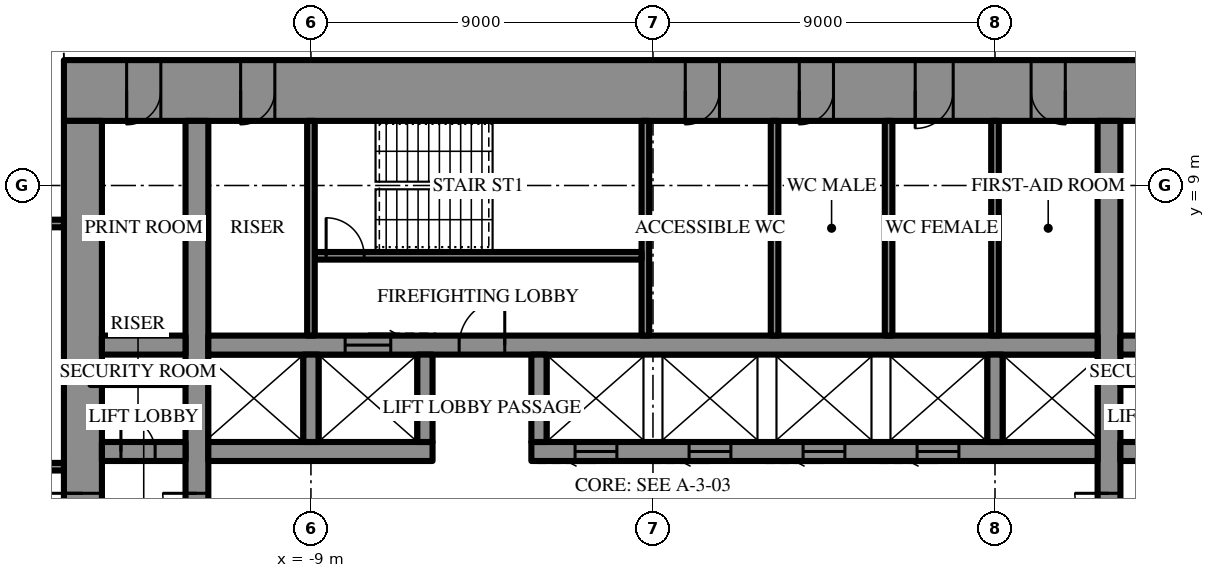
"""IFC4 building model, lengths in metres.
Left out: names, types, materials, properties, quantities, classifications, styles, units other than length and angle.
Written with IfcOpenShell. Run it as: python <this file> out.ifc"""

import sys

from ifc_helpers import new_model, si_unit, direction, frame, frame_2d, origin, place, context, subcontext, project, spatial, rectangle, extrude, element, fill, save


model = new_model("IFC4")
c1 = context("Model", 3, precision=1e-05, world=origin(), true_north=direction((0.0, 1.0)))
c2 = subcontext(c1, "Body", "Model", "MODEL_VIEW")
j1 = project(units=[si_unit("LENGTHUNIT", "METRE"), si_unit("PLANEANGLEUNIT", "RADIAN")], contexts=[c1])
p1 = place(None, origin())
s1 = spatial("IfcSite", under=j1, at=p1, CompositionType="ELEMENT")
p2 = place(p1, origin())
s2 = spatial("IfcBuilding", under=s1, at=p2, CompositionType="ELEMENT")
p3 = place(p2, frame((0.0, 0.0, 249.1)))
s3 = spatial("IfcBuildingStorey", under=s2, at=p3, CompositionType="ELEMENT", Elevation=249.1)
p4 = place(p3, frame((-15.5, 11.5, 0.0), z_axis=(0.0, 0.0, 1.0), x_axis=(1.0, 0.0, 0.0)))
e1 = element("IfcWall", 1, at=p4, inside=s3, PredefinedType="SHEAR", context=c2, shape_type="SweptSolid", body=[
    extrude(rectangle(XDim=31.0, YDim=1.6, at=frame_2d((15.5, 0.0))), origin(), (0.0, 0.0, 1.0), 4.2),
])
p5 = place(p4, frame((16.35, 0.0, 0.0)))
e2 = element("IfcOpeningElement", 2, at=p5, cuts=e1, PredefinedType="OPENING", context=c2, shape_type="SweptSolid", body=[
    extrude(rectangle(XDim=0.9, YDim=2.2, at=frame_2d((0.45, 1.1))), frame((0.0, 0.81, 0.0), z_axis=(0.0, -1.0, 0.0), x_axis=(1.0, 0.0, 0.0)), (0.0, 0.0, 1.0), 1.62),
])
p6 = place(p4, frame((19.35, 0.0, 0.0)))
e3 = element("IfcOpeningElement", 3, at=p6, cuts=e1, PredefinedType="OPENING", context=c2, shape_type="SweptSolid", body=[
    extrude(rectangle(XDim=0.9, YDim=2.2, at=frame_2d((0.45, 1.1))), frame((0.0, 0.81, 0.0), z_axis=(0.0, -1.0, 0.0), x_axis=(1.0, 0.0, 0.0)), (0.0, 0.0, 1.0), 1.62),
])
p7 = place(p4, frame((22.4, 0.0, 0.0)))
e4 = element("IfcOpeningElement", 4, at=p7, cuts=e1, PredefinedType="OPENING", context=c2, shape_type="SweptSolid", body=[
    extrude(rectangle(XDim=1.0, YDim=2.2, at=frame_2d((0.5, 1.1))), frame((0.0, 0.81, 0.0), z_axis=(0.0, -1.0, 0.0), x_axis=(1.0, 0.0, 0.0)), (0.0, 0.0, 1.0), 1.62),
])
p8 = place(p4, frame((1.65, 0.0, 0.0)))
e5 = element("IfcOpeningElement", 5, at=p8, cuts=e1, PredefinedType="OPENING", context=c2, shape_type="SweptSolid", body=[
    extrude(rectangle(XDim=0.9, YDim=2.2, at=frame_2d((0.45, 1.1))), frame((0.0, 0.81, 0.0), z_axis=(0.0, -1.0, 0.0), x_axis=(1.0, 0.0, 0.0)), (0.0, 0.0, 1.0), 1.62),
])
p9 = place(p4, frame((4.65, 0.0, 0.0)))
e6 = element("IfcOpeningElement", 6, at=p9, cuts=e1, PredefinedType="OPENING", context=c2, shape_type="SweptSolid", body=[
    extrude(rectangle(XDim=0.9, YDim=2.2, at=frame_2d((0.45, 1.1))), frame((0.0, 0.81, 0.0), z_axis=(0.0, -1.0, 0.0), x_axis=(1.0, 0.0, 0.0)), (0.0, 0.0, 1.0), 1.62),
])
p10 = place(p4, frame((25.45, 0.0, 0.0)))
e7 = element("IfcOpeningElement", 7, at=p10, cuts=e1, PredefinedType="OPENING", context=c2, shape_type="SweptSolid", body=[
    extrude(rectangle(XDim=0.9, YDim=2.2, at=frame_2d((0.45, 1.1))), frame((0.0, 0.81, 0.0), z_axis=(0.0, -1.0, 0.0), x_axis=(1.0, 0.0, 0.0)), (0.0, 0.0, 1.0), 1.62),
])
p11 = place(p4, frame((28.45, 0.0, 0.0)))
e8 = element("IfcOpeningElement", 8, at=p11, cuts=e1, PredefinedType="OPENING", context=c2, shape_type="SweptSolid", body=[
    extrude(rectangle(XDim=0.9, YDim=2.2, at=frame_2d((0.45, 1.1))), frame((0.0, 0.81, 0.0), z_axis=(0.0, -1.0, 0.0), x_axis=(1.0, 0.0, 0.0)), (0.0, 0.0, 1.0), 1.62),
])
p12 = place(p3, frame((-15.0, 10.7, 0.0), z_axis=(0.0, 0.0, 1.0), x_axis=(0.0, -1.0, 0.0)))
e9 = element("IfcWall", 9, at=p12, inside=s3, PredefinedType="SHEAR", context=c2, shape_type="SweptSolid", body=[
    extrude(rectangle(XDim=21.4, YDim=1.0, at=frame_2d((10.7, 0.0))), origin(), (0.0, 0.0, 1.0), 4.2),
])
p13 = place(p12, frame((9.8, 0.0, 0.0)))
e10 = element("IfcOpeningElement", 10, at=p13, cuts=e9, PredefinedType="OPENING", context=c2, shape_type="SweptSolid", body=[
    extrude(rectangle(XDim=1.8, YDim=2.4, at=frame_2d((0.9, 1.2))), frame((0.0, 0.51, 0.0), z_axis=(0.0, -1.0, 0.0), x_axis=(1.0, 0.0, 0.0)), (0.0, 0.0, 1.0), 1.02),
])
p14 = place(p3, frame((12.0, -10.7, 0.0), z_axis=(0.0, 0.0, 1.0), x_axis=(0.0, 1.0, 0.0)))
e11 = element("IfcWall", 11, at=p14, inside=s3, PredefinedType="SHEAR", context=c2, shape_type="SweptSolid", body=[
    extrude(rectangle(XDim=21.4, YDim=0.6, at=frame_2d((10.7, 0.0))), origin(), (0.0, 0.0, 1.0), 4.2),
])
p15 = place(p14, frame((9.8, 0.0, 0.0)))
e12 = element("IfcOpeningElement", 12, at=p15, cuts=e11, PredefinedType="OPENING", context=c2, shape_type="SweptSolid", body=[
    extrude(rectangle(XDim=1.8, YDim=2.4, at=frame_2d((0.9, 1.2))), frame((0.0, 0.31, 0.0), z_axis=(0.0, -1.0, 0.0), x_axis=(1.0, 0.0, 0.0)), (0.0, 0.0, 1.0), 0.62),
])
p16 = place(p3, frame((-12.0, -10.7, 0.0), z_axis=(0.0, 0.0, 1.0), x_axis=(0.0, 1.0, 0.0)))
e13 = element("IfcWall", 13, at=p16, inside=s3, PredefinedType="SHEAR", context=c2, shape_type="SweptSolid", body=[
    extrude(rectangle(XDim=21.4, YDim=0.6, at=frame_2d((10.7, 0.0))), origin(), (0.0, 0.0, 1.0), 4.2),
])
p17 = place(p16, frame((9.8, 0.0, 0.0)))
e14 = element("IfcOpeningElement", 14, at=p17, cuts=e13, PredefinedType="OPENING", context=c2, shape_type="SweptSolid", body=[
    extrude(rectangle(XDim=1.8, YDim=2.4, at=frame_2d((0.9, 1.2))), frame((0.0, 0.31, 0.0), z_axis=(0.0, -1.0, 0.0), x_axis=(1.0, 0.0, 0.0)), (0.0, 0.0, 1.0), 0.62),
])
p18 = place(p3, frame((-14.5, 2.0, 0.0), z_axis=(0.0, 0.0, 1.0), x_axis=(1.0, 0.0, 0.0)))
e15 = element("IfcWall", 15, at=p18, inside=s3, PredefinedType="SHEAR", context=c2, shape_type="SweptSolid", body=[
    extrude(rectangle(XDim=2.2, YDim=0.5, at=frame_2d((1.1, 0.0))), origin(), (0.0, 0.0, 1.0), 4.2),
])
p19 = place(p18, frame((0.5, 0.0, 0.0)))
e16 = element("IfcOpeningElement", 16, at=p19, cuts=e15, PredefinedType="OPENING", context=c2, shape_type="SweptSolid", body=[
    extrude(rectangle(XDim=0.9, YDim=2.2, at=frame_2d((0.45, 1.1))), frame((0.0, 0.26, 0.0), z_axis=(0.0, -1.0, 0.0), x_axis=(1.0, 0.0, 0.0)), (0.0, 0.0, 1.0), 0.52),
])
p20 = place(p3, frame((-11.7, 2.0, 0.0), z_axis=(0.0, 0.0, 1.0), x_axis=(1.0, 0.0, 0.0)))
e17 = element("IfcWall", 17, at=p20, inside=s3, PredefinedType="SHEAR", context=c2, shape_type="SweptSolid", body=[
    extrude(rectangle(XDim=5.9, YDim=0.5, at=frame_2d((2.95, 0.0))), origin(), (0.0, 0.0, 1.0), 4.2),
])
p21 = place(p3, frame((-3.2, 2.0, 0.0), z_axis=(0.0, 0.0, 1.0), x_axis=(1.0, 0.0, 0.0)))
e18 = element("IfcWall", 18, at=p21, inside=s3, PredefinedType="SHEAR", context=c2, shape_type="SweptSolid", body=[
    extrude(rectangle(XDim=14.9, YDim=0.5, at=frame_2d((7.45, 0.0))), origin(), (0.0, 0.0, 1.0), 4.2),
])
p22 = place(p21, frame((1.15, 0.0, 0.0)))
e19 = element("IfcOpeningElement", 19, at=p22, cuts=e18, PredefinedType="OPENING", context=c2, shape_type="SweptSolid", body=[
    extrude(rectangle(XDim=1.1, YDim=2.2, at=frame_2d((0.55, 1.1))), frame((0.0, 0.26, 0.0), z_axis=(0.0, -1.0, 0.0), x_axis=(1.0, 0.0, 0.0)), (0.0, 0.0, 1.0), 0.52),
])
p23 = place(p21, frame((4.15, 0.0, 0.0)))
e20 = element("IfcOpeningElement", 20, at=p23, cuts=e18, PredefinedType="OPENING", context=c2, shape_type="SweptSolid", body=[
    extrude(rectangle(XDim=1.1, YDim=2.2, at=frame_2d((0.55, 1.1))), frame((0.0, 0.26, 0.0), z_axis=(0.0, -1.0, 0.0), x_axis=(1.0, 0.0, 0.0)), (0.0, 0.0, 1.0), 0.52),
])
p24 = place(p21, frame((7.15, 0.0, 0.0)))
e21 = element("IfcOpeningElement", 21, at=p24, cuts=e18, PredefinedType="OPENING", context=c2, shape_type="SweptSolid", body=[
    extrude(rectangle(XDim=1.1, YDim=2.2, at=frame_2d((0.55, 1.1))), frame((0.0, 0.26, 0.0), z_axis=(0.0, -1.0, 0.0), x_axis=(1.0, 0.0, 0.0)), (0.0, 0.0, 1.0), 0.52),
])
p25 = place(p21, frame((10.15, 0.0, 0.0)))
e22 = element("IfcOpeningElement", 22, at=p25, cuts=e18, PredefinedType="OPENING", context=c2, shape_type="SweptSolid", body=[
    extrude(rectangle(XDim=1.1, YDim=2.2, at=frame_2d((0.55, 1.1))), frame((0.0, 0.26, 0.0), z_axis=(0.0, -1.0, 0.0), x_axis=(1.0, 0.0, 0.0)), (0.0, 0.0, 1.0), 0.52),
])
p26 = place(p3, frame((12.3, 2.0, 0.0), z_axis=(0.0, 0.0, 1.0), x_axis=(1.0, 0.0, 0.0)))
e23 = element("IfcWall", 23, at=p26, inside=s3, PredefinedType="SHEAR", context=c2, shape_type="SweptSolid", body=[
    extrude(rectangle(XDim=2.2, YDim=0.5, at=frame_2d((1.1, 0.0))), origin(), (0.0, 0.0, 1.0), 4.2),
])
p27 = place(p26, frame((0.8, 0.0, 0.0)))
e24 = element("IfcOpeningElement", 24, at=p27, cuts=e23, PredefinedType="OPENING", context=c2, shape_type="SweptSolid", body=[
    extrude(rectangle(XDim=0.9, YDim=2.2, at=frame_2d((0.45, 1.1))), frame((0.0, 0.26, 0.0), z_axis=(0.0, -1.0, 0.0), x_axis=(1.0, 0.0, 0.0)), (0.0, 0.0, 1.0), 0.52),
])
p28 = place(p3, frame((-14.5, 4.8, 0.0), z_axis=(0.0, 0.0, 1.0), x_axis=(1.0, 0.0, 0.0)))
e25 = element("IfcWall", 25, at=p28, inside=s3, PredefinedType="SHEAR", context=c2, shape_type="SweptSolid", body=[
    extrude(rectangle(XDim=2.2, YDim=0.5, at=frame_2d((1.1, 0.0))), origin(), (0.0, 0.0, 1.0), 4.2),
])
p29 = place(p3, frame((-11.7, 4.8, 0.0), z_axis=(0.0, 0.0, 1.0), x_axis=(1.0, 0.0, 0.0)))
e26 = element("IfcWall", 26, at=p29, inside=s3, PredefinedType="SHEAR", context=c2, shape_type="SweptSolid", body=[
    extrude(rectangle(XDim=23.4, YDim=0.5, at=frame_2d((11.7, 0.0))), origin(), (0.0, 0.0, 1.0), 4.2),
])
p30 = place(p29, frame((6.6, 0.0, 0.0)))
e27 = element("IfcOpeningElement", 27, at=p30, cuts=e26, PredefinedType="OPENING", context=c2, shape_type="SweptSolid", body=[
    extrude(rectangle(XDim=1.2, YDim=2.2, at=frame_2d((0.6, 1.1))), frame((0.0, 0.26, 0.0), z_axis=(0.0, -1.0, 0.0), x_axis=(1.0, 0.0, 0.0)), (0.0, 0.0, 1.0), 0.52),
])
p31 = place(p29, frame((3.6, 0.0, 0.0)))
e28 = element("IfcOpeningElement", 28, at=p31, cuts=e26, PredefinedType="OPENING", context=c2, shape_type="SweptSolid", body=[
    extrude(rectangle(XDim=1.2, YDim=2.2, at=frame_2d((0.6, 1.1))), frame((0.0, 0.26, 0.0), z_axis=(0.0, -1.0, 0.0), x_axis=(1.0, 0.0, 0.0)), (0.0, 0.0, 1.0), 0.52),
])
p32 = place(p3, frame((12.3, 4.8, 0.0), z_axis=(0.0, 0.0, 1.0), x_axis=(1.0, 0.0, 0.0)))
e29 = element("IfcWall", 29, at=p32, inside=s3, PredefinedType="SHEAR", context=c2, shape_type="SweptSolid", body=[
    extrude(rectangle(XDim=2.2, YDim=0.5, at=frame_2d((1.1, 0.0))), origin(), (0.0, 0.0, 1.0), 4.2),
])
for number, where, z_axis, x_axis in (
    (30, (-9.0, 2.25, 0.0), (0.0, 0.0, 1.0), (0.0, 1.0, 0.0)),
    (31, (-6.0, 2.25, 0.0), (0.0, 0.0, 1.0), (0.0, 1.0, 0.0)),
    (32, (-3.0, 2.25, 0.0), (0.0, 0.0, 1.0), (0.0, 1.0, 0.0)),
    (33, (9.0, 2.25, 0.0), (0.0, 0.0, 1.0), (0.0, 1.0, 0.0)),
):
    element("IfcWall", number, at=place(p3, frame(where, z_axis=z_axis, x_axis=x_axis)), inside=s3, PredefinedType="SHEAR", context=c2, shape_type="SweptSolid", body=[
        extrude(rectangle(XDim=2.3, YDim=0.4, at=frame_2d((1.15, 0.0))), origin(), (0.0, 0.0, 1.0), 4.2),
    ])
p33 = place(p3, frame((-0.2, 5.05, 0.0), z_axis=(0.0, 0.0, 1.0), x_axis=(0.0, 1.0, 0.0)))
e34 = element("IfcWall", 34, at=p33, inside=s3, PredefinedType="SHEAR", context=c2, shape_type="SweptSolid", body=[
    extrude(rectangle(XDim=5.65, YDim=0.2, at=frame_2d((2.825, 0.0))), origin(), (0.0, 0.0, 1.0), 4.2),
])
p34 = place(p3, frame((-8.9, 7.15, 0.0), z_axis=(0.0, 0.0, 1.0), x_axis=(1.0, 0.0, 0.0)))
e35 = element("IfcWall", 35, at=p34, inside=s3, PredefinedType="SHEAR", context=c2, shape_type="SweptSolid", body=[
    extrude(rectangle(XDim=8.6, YDim=0.2, at=frame_2d((4.3, 0.0))), origin(), (0.0, 0.0, 1.0), 4.2),
])
p35 = place(p34, frame((0.3, 0.0, 0.0)))
e36 = element("IfcOpeningElement", 36, at=p35, cuts=e35, PredefinedType="OPENING", context=c2, shape_type="SweptSolid", body=[
    extrude(rectangle(XDim=1.0, YDim=2.2, at=frame_2d((0.5, 1.1))), frame((0.0, 0.11, 0.0), z_axis=(0.0, -1.0, 0.0), x_axis=(1.0, 0.0, 0.0)), (0.0, 0.0, 1.0), 0.22),
])
for number, where, z_axis, x_axis in (
    (37, (-9.0, 5.05, 0.0), (0.0, 0.0, 1.0), (0.0, 1.0, 0.0)),
    (38, (9.0, 5.05, 0.0), (0.0, 0.0, 1.0), (0.0, 1.0, 0.0)),
    (39, (3.2, 5.05, 0.0), (0.0, 0.0, 1.0), (0.0, 1.0, 0.0)),
    (40, (6.2, 5.05, 0.0), (0.0, 0.0, 1.0), (0.0, 1.0, 0.0)),
):
    element("IfcWall", number, at=place(p3, frame(where, z_axis=z_axis, x_axis=x_axis)), inside=s3, PredefinedType="PARTITIONING", context=c2, shape_type="SweptSolid", body=[
        extrude(rectangle(XDim=5.65, YDim=0.2, at=frame_2d((2.825, 0.0))), origin(), (0.0, 0.0, 1.0), 4.0),
    ])
for number, where, z_axis, x_axis in (
    (41, (-14.8, 3.85, 0.0), (0.0, 0.0, 1.0), (1.0, 0.0, 0.0)),
    (42, (12.3, 3.85, 0.0), (0.0, 0.0, 1.0), (1.0, 0.0, 0.0)),
):
    element("IfcWall", number, at=place(p3, frame(where, z_axis=z_axis, x_axis=x_axis)), inside=s3, PredefinedType="PARTITIONING", context=c2, shape_type="SweptSolid", body=[
        extrude(rectangle(XDim=2.5, YDim=0.2, at=frame_2d((1.25, 0.0))), origin(), (0.0, 0.0, 1.0), 4.0),
    ])
p36 = place(p3, frame((-15.5, 1.6, 0.0), z_axis=(0.0, 0.0, 1.0), x_axis=(-1.0, 0.0, 0.0)))
e43 = element("IfcWall", 43, at=p36, inside=s3, PredefinedType="PARTITIONING", context=c2, shape_type="SweptSolid", body=[
    extrude(rectangle(XDim=10.7, YDim=0.2, at=frame_2d((5.35, 0.0))), origin(), (0.0, 0.0, 1.0), 4.0),
])
p37 = place(p36, frame((4.85, 0.0, 0.0)))
e44 = element("IfcOpeningElement", 44, at=p37, cuts=e43, PredefinedType="OPENING", context=c2, shape_type="SweptSolid", body=[
    extrude(rectangle(XDim=1.0, YDim=2.2, at=frame_2d((0.5, 1.1))), frame((0.0, 0.11, 0.0), z_axis=(0.0, -1.0, 0.0), x_axis=(1.0, 0.0, 0.0)), (0.0, 0.0, 1.0), 0.22),
])
p38 = place(p3, frame((-15.5, 8.0, 0.0), z_axis=(0.0, 0.0, 1.0), x_axis=(-1.0, 0.0, 0.0)))
e45 = element("IfcWall", 45, at=p38, inside=s3, PredefinedType="PARTITIONING", context=c2, shape_type="SweptSolid", body=[
    extrude(rectangle(XDim=13.113, YDim=0.2, at=frame_2d((6.557, 0.0))), origin(), (0.0, 0.0, 1.0), 4.0),
])
p39 = place(p38, frame((0.811, 0.0, 0.0)))
e46 = element("IfcOpeningElement", 46, at=p39, cuts=e45, PredefinedType="OPENING", context=c2, shape_type="SweptSolid", body=[
    extrude(rectangle(XDim=1.0, YDim=2.2, at=frame_2d((0.5, 1.1))), frame((0.0, 0.11, 0.0), z_axis=(0.0, -1.0, 0.0), x_axis=(1.0, 0.0, 0.0)), (0.0, 0.0, 1.0), 0.22),
])
p40 = place(p13, frame((1.8, 0.0, 0.0), z_axis=(0.0, 0.0, 1.0), x_axis=(-1.0, 0.0, 0.0)))
e47 = element("IfcDoor", 47, at=p40, inside=s3, OperationType="DOUBLE_DOOR_SINGLE_SWING", PredefinedType="DOOR", context=c2, shape_type="SweptSolid", body=[
    extrude(rectangle(XDim=1.8, YDim=2.4, at=frame_2d((0.9, 1.2))), frame((0.0, 0.025, 0.0), z_axis=(0.0, -1.0, 0.0), x_axis=(1.0, 0.0, 0.0)), (0.0, 0.0, 1.0), 0.05),
])
fill(e10, e47)
p41 = place(p30, origin())
e48 = element("IfcDoor", 48, at=p41, inside=s3, OperationType="SINGLE_SWING_LEFT", PredefinedType="DOOR", context=c2, shape_type="SweptSolid", body=[
    extrude(rectangle(XDim=1.2, YDim=2.2, at=frame_2d((0.6, 1.1))), frame((0.0, 0.025, 0.0), z_axis=(0.0, -1.0, 0.0), x_axis=(1.0, 0.0, 0.0)), (0.0, 0.0, 1.0), 0.05),
])
fill(e27, e48)
p42 = place(p35, origin())
e49 = element("IfcDoor", 49, at=p42, inside=s3, OperationType="SINGLE_SWING_RIGHT", PredefinedType="DOOR", context=c2, shape_type="SweptSolid", body=[
    extrude(rectangle(XDim=1.0, YDim=2.2, at=frame_2d((0.5, 1.1))), frame((0.0, 0.025, 0.0), z_axis=(0.0, -1.0, 0.0), x_axis=(1.0, 0.0, 0.0)), (0.0, 0.0, 1.0), 0.05),
])
fill(e36, e49)
p43 = place(p5, frame((0.9, 0.0, 0.0), z_axis=(0.0, 0.0, 1.0), x_axis=(-1.0, 0.0, 0.0)))
e50 = element("IfcDoor", 50, at=p43, inside=s3, OperationType="SINGLE_SWING_LEFT", PredefinedType="DOOR", context=c2, shape_type="SweptSolid", body=[
    extrude(rectangle(XDim=0.9, YDim=2.2, at=frame_2d((0.45, 1.1))), frame((0.0, 0.025, 0.0), z_axis=(0.0, -1.0, 0.0), x_axis=(1.0, 0.0, 0.0)), (0.0, 0.0, 1.0), 0.05),
])
fill(e2, e50)
p44 = place(p6, frame((0.9, 0.0, 0.0), z_axis=(0.0, 0.0, 1.0), x_axis=(-1.0, 0.0, 0.0)))
e51 = element("IfcDoor", 51, at=p44, inside=s3, OperationType="SINGLE_SWING_LEFT", PredefinedType="DOOR", context=c2, shape_type="SweptSolid", body=[
    extrude(rectangle(XDim=0.9, YDim=2.2, at=frame_2d((0.45, 1.1))), frame((0.0, 0.025, 0.0), z_axis=(0.0, -1.0, 0.0), x_axis=(1.0, 0.0, 0.0)), (0.0, 0.0, 1.0), 0.05),
])
fill(e3, e51)
p45 = place(p7, frame((1.0, 0.0, 0.0), z_axis=(0.0, 0.0, 1.0), x_axis=(-1.0, 0.0, 0.0)))
e52 = element("IfcDoor", 52, at=p45, inside=s3, OperationType="SINGLE_SWING_LEFT", PredefinedType="DOOR", context=c2, shape_type="SweptSolid", body=[
    extrude(rectangle(XDim=1.0, YDim=2.2, at=frame_2d((0.5, 1.1))), frame((0.0, 0.025, 0.0), z_axis=(0.0, -1.0, 0.0), x_axis=(1.0, 0.0, 0.0)), (0.0, 0.0, 1.0), 0.05),
])
fill(e4, e52)
p46 = place(p8, frame((0.9, 0.0, 0.0), z_axis=(0.0, 0.0, 1.0), x_axis=(-1.0, 0.0, 0.0)))
e53 = element("IfcDoor", 53, at=p46, inside=s3, OperationType="SINGLE_SWING_LEFT", PredefinedType="DOOR", context=c2, shape_type="SweptSolid", body=[
    extrude(rectangle(XDim=0.9, YDim=2.2, at=frame_2d((0.45, 1.1))), frame((0.0, 0.025, 0.0), z_axis=(0.0, -1.0, 0.0), x_axis=(1.0, 0.0, 0.0)), (0.0, 0.0, 1.0), 0.05),
])
fill(e5, e53)
p47 = place(p9, frame((0.9, 0.0, 0.0), z_axis=(0.0, 0.0, 1.0), x_axis=(-1.0, 0.0, 0.0)))
e54 = element("IfcDoor", 54, at=p47, inside=s3, OperationType="SINGLE_SWING_LEFT", PredefinedType="DOOR", context=c2, shape_type="SweptSolid", body=[
    extrude(rectangle(XDim=0.9, YDim=2.2, at=frame_2d((0.45, 1.1))), frame((0.0, 0.025, 0.0), z_axis=(0.0, -1.0, 0.0), x_axis=(1.0, 0.0, 0.0)), (0.0, 0.0, 1.0), 0.05),
])
fill(e6, e54)
p48 = place(p10, frame((0.9, 0.0, 0.0), z_axis=(0.0, 0.0, 1.0), x_axis=(-1.0, 0.0, 0.0)))
e55 = element("IfcDoor", 55, at=p48, inside=s3, OperationType="SINGLE_SWING_RIGHT", PredefinedType="DOOR", context=c2, shape_type="SweptSolid", body=[
    extrude(rectangle(XDim=0.9, YDim=2.2, at=frame_2d((0.45, 1.1))), frame((0.0, 0.025, 0.0), z_axis=(0.0, -1.0, 0.0), x_axis=(1.0, 0.0, 0.0)), (0.0, 0.0, 1.0), 0.05),
])
fill(e7, e55)
p49 = place(p19, origin())
e56 = element("IfcDoor", 56, at=p49, inside=s3, OperationType="SINGLE_SWING_RIGHT", PredefinedType="DOOR", context=c2, shape_type="SweptSolid", body=[
    extrude(rectangle(XDim=0.9, YDim=2.2, at=frame_2d((0.45, 1.1))), frame((0.0, 0.025, 0.0), z_axis=(0.0, -1.0, 0.0), x_axis=(1.0, 0.0, 0.0)), (0.0, 0.0, 1.0), 0.05),
])
fill(e16, e56)
p50 = place(p15, origin())
e57 = element("IfcDoor", 57, at=p50, inside=s3, OperationType="DOUBLE_DOOR_SINGLE_SWING", PredefinedType="DOOR", context=c2, shape_type="SweptSolid", body=[
    extrude(rectangle(XDim=1.8, YDim=2.4, at=frame_2d((0.9, 1.2))), frame((0.0, 0.025, 0.0), z_axis=(0.0, -1.0, 0.0), x_axis=(1.0, 0.0, 0.0)), (0.0, 0.0, 1.0), 0.05),
])
fill(e12, e57)
p51 = place(p17, origin())
e58 = element("IfcDoor", 58, at=p51, inside=s3, OperationType="DOUBLE_DOOR_SINGLE_SWING", PredefinedType="DOOR", context=c2, shape_type="SweptSolid", body=[
    extrude(rectangle(XDim=1.8, YDim=2.4, at=frame_2d((0.9, 1.2))), frame((0.0, 0.025, 0.0), z_axis=(0.0, -1.0, 0.0), x_axis=(1.0, 0.0, 0.0)), (0.0, 0.0, 1.0), 0.05),
])
fill(e14, e58)
p52 = place(p31, origin())
e59 = element("IfcDoor", 59, at=p52, inside=s3, OperationType="SLIDING_TO_LEFT", PredefinedType="DOOR", context=c2, shape_type="SweptSolid", body=[
    extrude(rectangle(XDim=1.2, YDim=2.2, at=frame_2d((0.6, 1.1))), frame((0.0, 0.025, 0.0), z_axis=(0.0, -1.0, 0.0), x_axis=(1.0, 0.0, 0.0)), (0.0, 0.0, 1.0), 0.05),
])
fill(e28, e59)
p53 = place(p22, frame((1.1, 0.0, 0.0), z_axis=(0.0, 0.0, 1.0), x_axis=(-1.0, 0.0, 0.0)))
e60 = element("IfcDoor", 60, at=p53, inside=s3, OperationType="SLIDING_TO_LEFT", PredefinedType="DOOR", context=c2, shape_type="SweptSolid", body=[
    extrude(rectangle(XDim=1.1, YDim=2.2, at=frame_2d((0.55, 1.1))), frame((0.0, 0.025, 0.0), z_axis=(0.0, -1.0, 0.0), x_axis=(1.0, 0.0, 0.0)), (0.0, 0.0, 1.0), 0.05),
])
fill(e19, e60)
p54 = place(p23, frame((1.1, 0.0, 0.0), z_axis=(0.0, 0.0, 1.0), x_axis=(-1.0, 0.0, 0.0)))
e61 = element("IfcDoor", 61, at=p54, inside=s3, OperationType="SLIDING_TO_LEFT", PredefinedType="DOOR", context=c2, shape_type="SweptSolid", body=[
    extrude(rectangle(XDim=1.1, YDim=2.2, at=frame_2d((0.55, 1.1))), frame((0.0, 0.025, 0.0), z_axis=(0.0, -1.0, 0.0), x_axis=(1.0, 0.0, 0.0)), (0.0, 0.0, 1.0), 0.05),
])
fill(e20, e61)
p55 = place(p24, frame((1.1, 0.0, 0.0), z_axis=(0.0, 0.0, 1.0), x_axis=(-1.0, 0.0, 0.0)))
e62 = element("IfcDoor", 62, at=p55, inside=s3, OperationType="SLIDING_TO_LEFT", PredefinedType="DOOR", context=c2, shape_type="SweptSolid", body=[
    extrude(rectangle(XDim=1.1, YDim=2.2, at=frame_2d((0.55, 1.1))), frame((0.0, 0.025, 0.0), z_axis=(0.0, -1.0, 0.0), x_axis=(1.0, 0.0, 0.0)), (0.0, 0.0, 1.0), 0.05),
])
fill(e21, e62)
p56 = place(p25, frame((1.1, 0.0, 0.0), z_axis=(0.0, 0.0, 1.0), x_axis=(-1.0, 0.0, 0.0)))
e63 = element("IfcDoor", 63, at=p56, inside=s3, OperationType="SLIDING_TO_LEFT", PredefinedType="DOOR", context=c2, shape_type="SweptSolid", body=[
    extrude(rectangle(XDim=1.1, YDim=2.2, at=frame_2d((0.55, 1.1))), frame((0.0, 0.025, 0.0), z_axis=(0.0, -1.0, 0.0), x_axis=(1.0, 0.0, 0.0)), (0.0, 0.0, 1.0), 0.05),
])
fill(e22, e63)
save(model, sys.argv[1])
